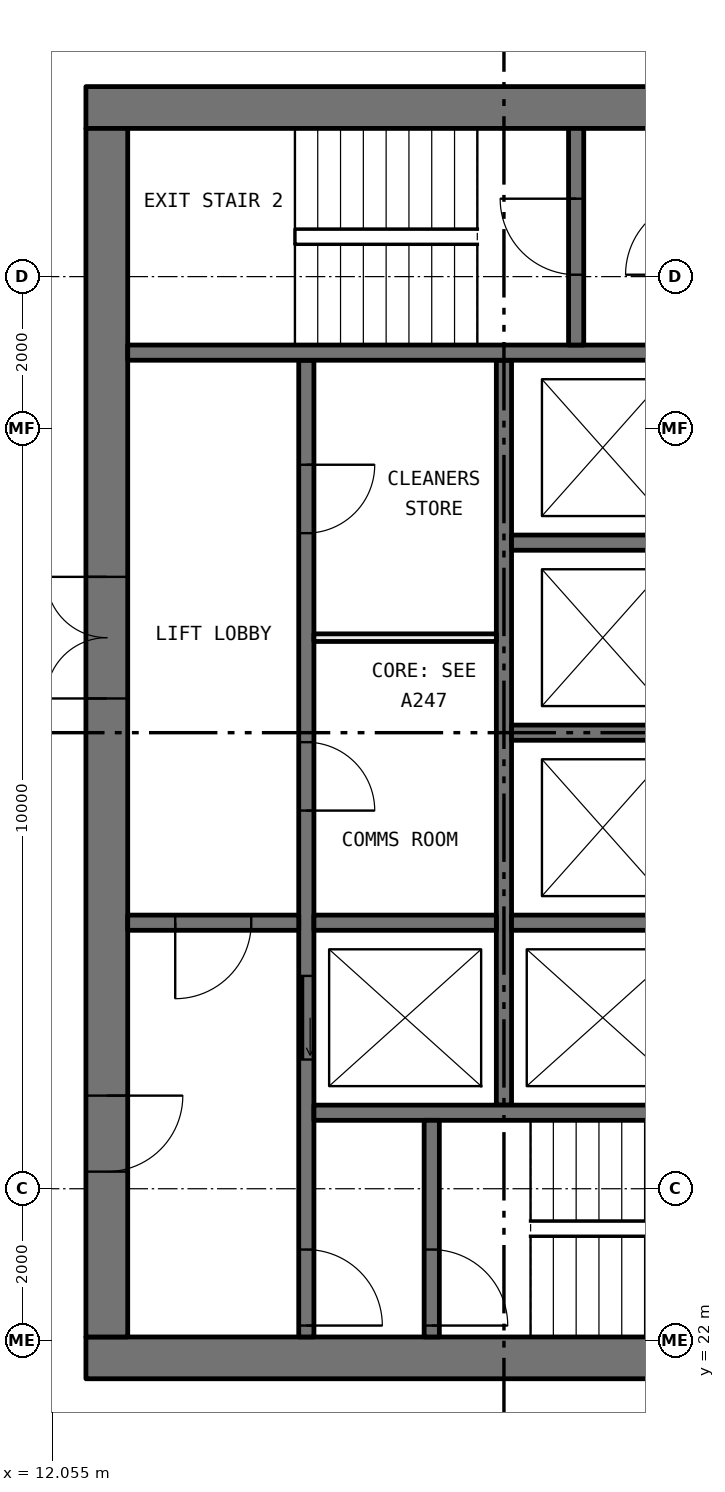
"""IFC4 building model, lengths in metres.
Left out: names, types, materials, properties, quantities, classifications, styles, units other than length and angle.
Written with IfcOpenShell. Run it as: python <this file> out.ifc"""

import sys

from ifc_helpers import new_model, si_unit, direction, frame, frame_2d, origin, place, context, subcontext, project, spatial, rectangle, extrude, element, fill, save


model = new_model("IFC4")
c1 = context("Model", 3, precision=1e-05, world=origin(), true_north=direction((0.0, 1.0)))
c2 = subcontext(c1, "Body", "Model", "MODEL_VIEW")
j1 = project(units=[si_unit("LENGTHUNIT", "METRE"), si_unit("PLANEANGLEUNIT", "RADIAN")], contexts=[c1])
p1 = place(None, origin())
s1 = spatial("IfcSite", under=j1, at=p1, CompositionType="ELEMENT")
p2 = place(p1, origin())
s2 = spatial("IfcBuilding", under=s1, at=p2, CompositionType="ELEMENT")
p3 = place(p2, frame((0.0, 0.0, 175.5)))
s3 = spatial("IfcBuildingStorey", under=s2, at=p3, CompositionType="ELEMENT", Elevation=175.5)
p4 = place(p3, frame((12.5, 21.775, 0.0), z_axis=(0.0, 0.0, 1.0), x_axis=(1.0, 0.0, 0.0)))
e1 = element("IfcWall", 1, at=p4, inside=s3, PredefinedType="SHEAR", context=c2, shape_type="SweptSolid", body=[
    extrude(rectangle(XDim=11.0, YDim=0.55, at=frame_2d((5.5, 0.0))), origin(), (0.0, 0.0, 1.0), 3.05),
])
p5 = place(p3, frame((12.5, 38.225, 0.0), z_axis=(0.0, 0.0, 1.0), x_axis=(1.0, 0.0, 0.0)))
e2 = element("IfcWall", 2, at=p5, inside=s3, PredefinedType="SHEAR", context=c2, shape_type="SweptSolid", body=[
    extrude(rectangle(XDim=11.0, YDim=0.55, at=frame_2d((5.5, 0.0))), origin(), (0.0, 0.0, 1.0), 3.05),
])
p6 = place(p5, frame((8.525, 0.0, 0.0)))
e3 = element("IfcOpeningElement", 3, at=p6, cuts=e2, PredefinedType="OPENING", context=c2, shape_type="SweptSolid", body=[
    extrude(rectangle(XDim=1.6, YDim=2.1, at=frame_2d((0.8, 1.05))), frame((0.0, 0.285, 0.0), z_axis=(0.0, -1.0, 0.0), x_axis=(1.0, 0.0, 0.0)), (0.0, 0.0, 1.0), 0.57),
])
p7 = place(p3, frame((12.775, 22.05, 0.0), z_axis=(0.0, 0.0, 1.0), x_axis=(0.0, 1.0, 0.0)))
e4 = element("IfcWall", 4, at=p7, inside=s3, PredefinedType="SHEAR", context=c2, shape_type="SweptSolid", body=[
    extrude(rectangle(XDim=15.9, YDim=0.55, at=frame_2d((7.95, 0.0))), origin(), (0.0, 0.0, 1.0), 3.05),
])
p8 = place(p7, frame((8.4, 0.0, 0.0)))
e5 = element("IfcOpeningElement", 5, at=p8, cuts=e4, PredefinedType="OPENING", context=c2, shape_type="SweptSolid", body=[
    extrude(rectangle(XDim=1.6, YDim=2.1, at=frame_2d((0.8, 1.05))), frame((0.0, 0.285, 0.0), z_axis=(0.0, -1.0, 0.0), x_axis=(1.0, 0.0, 0.0)), (0.0, 0.0, 1.0), 0.57),
])
p9 = place(p7, frame((2.175, 0.0, 0.0)))
e6 = element("IfcOpeningElement", 6, at=p9, cuts=e4, PredefinedType="OPENING", context=c2, shape_type="SweptSolid", body=[
    extrude(rectangle(XDim=1.0, YDim=2.1, at=frame_2d((0.5, 1.05))), frame((0.0, 0.285, 0.0), z_axis=(0.0, -1.0, 0.0), x_axis=(1.0, 0.0, 0.0)), (0.0, 0.0, 1.0), 0.57),
])
p10 = place(p3, frame((15.4, 22.05, 0.0), z_axis=(0.0, 0.0, 1.0), x_axis=(0.0, 1.0, 0.0)))
e7 = element("IfcWall", 7, at=p10, inside=s3, PredefinedType="SOLIDWALL", context=c2, shape_type="SweptSolid", body=[
    extrude(rectangle(XDim=12.85, YDim=0.2, at=frame_2d((6.425, 0.0))), origin(), (0.0, 0.0, 1.0), 3.05),
])
p11 = place(p10, frame((3.65, 0.0, 0.0)))
e8 = element("IfcOpeningElement", 8, at=p11, cuts=e7, PredefinedType="OPENING", context=c2, shape_type="SweptSolid", body=[
    extrude(rectangle(XDim=1.1, YDim=2.1, at=frame_2d((0.55, 1.05))), frame((0.0, 0.11, 0.0), z_axis=(0.0, -1.0, 0.0), x_axis=(1.0, 0.0, 0.0)), (0.0, 0.0, 1.0), 0.22),
])
p12 = place(p10, frame((0.15, 0.0, 0.0)))
e9 = element("IfcOpeningElement", 9, at=p12, cuts=e7, PredefinedType="OPENING", context=c2, shape_type="SweptSolid", body=[
    extrude(rectangle(XDim=1.0, YDim=2.1, at=frame_2d((0.5, 1.05))), frame((0.0, 0.11, 0.0), z_axis=(0.0, -1.0, 0.0), x_axis=(1.0, 0.0, 0.0)), (0.0, 0.0, 1.0), 0.22),
])
p13 = place(p10, frame((6.925, 0.0, 0.0)))
e10 = element("IfcOpeningElement", 10, at=p13, cuts=e7, PredefinedType="OPENING", context=c2, shape_type="SweptSolid", body=[
    extrude(rectangle(XDim=0.9, YDim=2.1, at=frame_2d((0.45, 1.05))), frame((0.0, 0.11, 0.0), z_axis=(0.0, -1.0, 0.0), x_axis=(1.0, 0.0, 0.0)), (0.0, 0.0, 1.0), 0.22),
])
p14 = place(p10, frame((10.575, 0.0, 0.0)))
e11 = element("IfcOpeningElement", 11, at=p14, cuts=e7, PredefinedType="OPENING", context=c2, shape_type="SweptSolid", body=[
    extrude(rectangle(XDim=0.9, YDim=2.1, at=frame_2d((0.45, 1.05))), frame((0.0, 0.11, 0.0), z_axis=(0.0, -1.0, 0.0), x_axis=(1.0, 0.0, 0.0)), (0.0, 0.0, 1.0), 0.22),
])
p15 = place(p3, frame((18.0, 25.1, 0.0), z_axis=(0.0, 0.0, 1.0), x_axis=(0.0, 1.0, 0.0)))
e12 = element("IfcWall", 12, at=p15, inside=s3, PredefinedType="SOLIDWALL", context=c2, shape_type="SweptSolid", body=[
    extrude(rectangle(XDim=9.8, YDim=0.2, at=frame_2d((4.9, 0.0))), origin(), (0.0, 0.0, 1.0), 3.05),
])
for number, where, z_axis, x_axis in (
    (13, (15.5, 25.0, 0.0), (0.0, 0.0, 1.0), (1.0, 0.0, 0.0)),
    (14, (13.05, 35.0, 0.0), (0.0, 0.0, 1.0), (1.0, 0.0, 0.0)),
):
    element("IfcWall", number, at=place(p3, frame(where, z_axis=z_axis, x_axis=x_axis)), inside=s3, PredefinedType="SOLIDWALL", context=c2, shape_type="SweptSolid", body=[
        extrude(rectangle(XDim=7.45, YDim=0.2, at=frame_2d((3.725, 0.0))), origin(), (0.0, 0.0, 1.0), 3.05),
    ])
p16 = place(p3, frame((13.05, 27.5, 0.0), z_axis=(0.0, 0.0, 1.0), x_axis=(1.0, 0.0, 0.0)))
e15 = element("IfcWall", 15, at=p16, inside=s3, PredefinedType="SOLIDWALL", context=c2, shape_type="SweptSolid", body=[
    extrude(rectangle(XDim=2.25, YDim=0.2, at=frame_2d((1.125, 0.0))), origin(), (0.0, 0.0, 1.0), 3.05),
])
p17 = place(p16, frame((0.625, 0.0, 0.0)))
e16 = element("IfcOpeningElement", 16, at=p17, cuts=e15, PredefinedType="OPENING", context=c2, shape_type="SweptSolid", body=[
    extrude(rectangle(XDim=1.0, YDim=2.1, at=frame_2d((0.5, 1.05))), frame((0.0, 0.11, 0.0), z_axis=(0.0, -1.0, 0.0), x_axis=(1.0, 0.0, 0.0)), (0.0, 0.0, 1.0), 0.22),
])
p18 = place(p3, frame((17.05, 22.05, 0.0), z_axis=(0.0, 0.0, 1.0), x_axis=(0.0, 1.0, 0.0)))
e17 = element("IfcWall", 17, at=p18, inside=s3, PredefinedType="SOLIDWALL", context=c2, shape_type="SweptSolid", body=[
    extrude(rectangle(XDim=2.85, YDim=0.2, at=frame_2d((1.425, 0.0))), origin(), (0.0, 0.0, 1.0), 3.05),
])
p19 = place(p18, frame((0.15, 0.0, 0.0)))
e18 = element("IfcOpeningElement", 18, at=p19, cuts=e17, PredefinedType="OPENING", context=c2, shape_type="SweptSolid", body=[
    extrude(rectangle(XDim=1.0, YDim=2.1, at=frame_2d((0.5, 1.05))), frame((0.0, 0.11, 0.0), z_axis=(0.0, -1.0, 0.0), x_axis=(1.0, 0.0, 0.0)), (0.0, 0.0, 1.0), 0.22),
])
p20 = place(p3, frame((18.95, 35.1, 0.0), z_axis=(0.0, 0.0, 1.0), x_axis=(0.0, 1.0, 0.0)))
e19 = element("IfcWall", 19, at=p20, inside=s3, PredefinedType="SOLIDWALL", context=c2, shape_type="SweptSolid", body=[
    extrude(rectangle(XDim=2.85, YDim=0.2, at=frame_2d((1.425, 0.0))), origin(), (0.0, 0.0, 1.0), 3.05),
])
p21 = place(p20, frame((0.925, 0.0, 0.0)))
e20 = element("IfcOpeningElement", 20, at=p21, cuts=e19, PredefinedType="OPENING", context=c2, shape_type="SweptSolid", body=[
    extrude(rectangle(XDim=1.0, YDim=2.1, at=frame_2d((0.5, 1.05))), frame((0.0, 0.11, 0.0), z_axis=(0.0, -1.0, 0.0), x_axis=(1.0, 0.0, 0.0)), (0.0, 0.0, 1.0), 0.22),
])
for number, where, z_axis, x_axis in (
    (21, (15.5, 27.5, 0.0), (0.0, 0.0, 1.0), (1.0, 0.0, 0.0)),
    (22, (18.1, 27.5, 0.0), (0.0, 0.0, 1.0), (1.0, 0.0, 0.0)),
    (23, (18.1, 30.0, 0.0), (0.0, 0.0, 1.0), (1.0, 0.0, 0.0)),
    (24, (18.1, 32.5, 0.0), (0.0, 0.0, 1.0), (1.0, 0.0, 0.0)),
):
    element("IfcWall", number, at=place(p3, frame(where, z_axis=z_axis, x_axis=x_axis)), inside=s3, PredefinedType="SOLIDWALL", context=c2, shape_type="SweptSolid", body=[
        extrude(rectangle(XDim=2.4, YDim=0.2, at=frame_2d((1.2, 0.0))), origin(), (0.0, 0.0, 1.0), 3.05),
    ])
p22 = place(p3, frame((15.5, 31.25, 0.0), z_axis=(0.0, 0.0, 1.0), x_axis=(1.0, 0.0, 0.0)))
e25 = element("IfcWall", 25, at=p22, inside=s3, PredefinedType="PARTITIONING", context=c2, shape_type="SweptSolid", body=[
    extrude(rectangle(XDim=2.4, YDim=0.1, at=frame_2d((1.2, 0.0))), origin(), (0.0, 0.0, 1.0), 3.05),
])
p23 = place(p11, origin())
e26 = element("IfcDoor", 26, at=p23, inside=s3, OperationType="SLIDING_TO_LEFT", PredefinedType="DOOR", context=c2, shape_type="SweptSolid", body=[
    extrude(rectangle(XDim=1.1, YDim=2.1, at=frame_2d((0.55, 1.05))), frame((0.0, 0.025, 0.0), z_axis=(0.0, -1.0, 0.0), x_axis=(1.0, 0.0, 0.0)), (0.0, 0.0, 1.0), 0.05),
])
fill(e8, e26)
p24 = place(p19, frame((1.0, 0.0, 0.0), x_axis=(-1.0, 0.0, 0.0)))
e27 = element("IfcDoor", 27, at=p24, inside=s3, OperationType="SINGLE_SWING_LEFT", PredefinedType="DOOR", context=c2, shape_type="SweptSolid", body=[
    extrude(rectangle(XDim=1.0, YDim=2.1, at=frame_2d((0.5, 1.05))), frame((0.0, 0.025, 0.0), z_axis=(0.0, -1.0, 0.0), x_axis=(1.0, 0.0, 0.0)), (0.0, 0.0, 1.0), 0.05),
])
fill(e18, e27)
p25 = place(p12, frame((1.0, 0.0, 0.0), x_axis=(-1.0, 0.0, 0.0)))
e28 = element("IfcDoor", 28, at=p25, inside=s3, OperationType="SINGLE_SWING_LEFT", PredefinedType="DOOR", context=c2, shape_type="SweptSolid", body=[
    extrude(rectangle(XDim=1.0, YDim=2.1, at=frame_2d((0.5, 1.05))), frame((0.0, 0.025, 0.0), z_axis=(0.0, -1.0, 0.0), x_axis=(1.0, 0.0, 0.0)), (0.0, 0.0, 1.0), 0.05),
])
fill(e9, e28)
p26 = place(p21, origin())
e29 = element("IfcDoor", 29, at=p26, inside=s3, OperationType="SINGLE_SWING_LEFT", PredefinedType="DOOR", context=c2, shape_type="SweptSolid", body=[
    extrude(rectangle(XDim=1.0, YDim=2.1, at=frame_2d((0.5, 1.05))), frame((0.0, 0.025, 0.0), z_axis=(0.0, -1.0, 0.0), x_axis=(1.0, 0.0, 0.0)), (0.0, 0.0, 1.0), 0.05),
])
fill(e20, e29)
p27 = place(p17, frame((1.0, 0.0, 0.0), x_axis=(-1.0, 0.0, 0.0)))
e30 = element("IfcDoor", 30, at=p27, inside=s3, OperationType="SINGLE_SWING_LEFT", PredefinedType="DOOR", context=c2, shape_type="SweptSolid", body=[
    extrude(rectangle(XDim=1.0, YDim=2.1, at=frame_2d((0.5, 1.05))), frame((0.0, 0.025, 0.0), z_axis=(0.0, -1.0, 0.0), x_axis=(1.0, 0.0, 0.0)), (0.0, 0.0, 1.0), 0.05),
])
fill(e16, e30)
p28 = place(p8, origin())
e31 = element("IfcDoor", 31, at=p28, inside=s3, OperationType="DOUBLE_DOOR_SINGLE_SWING", PredefinedType="DOOR", context=c2, shape_type="SweptSolid", body=[
    extrude(rectangle(XDim=1.6, YDim=2.1, at=frame_2d((0.8, 1.05))), frame((0.0, 0.025, 0.0), z_axis=(0.0, -1.0, 0.0), x_axis=(1.0, 0.0, 0.0)), (0.0, 0.0, 1.0), 0.05),
])
fill(e5, e31)
p29 = place(p9, frame((1.0, 0.0, 0.0), x_axis=(-1.0, 0.0, 0.0)))
e32 = element("IfcDoor", 32, at=p29, inside=s3, OperationType="SINGLE_SWING_RIGHT", PredefinedType="DOOR", context=c2, shape_type="SweptSolid", body=[
    extrude(rectangle(XDim=1.0, YDim=2.1, at=frame_2d((0.5, 1.05))), frame((0.0, 0.025, 0.0), z_axis=(0.0, -1.0, 0.0), x_axis=(1.0, 0.0, 0.0)), (0.0, 0.0, 1.0), 0.05),
])
fill(e6, e32)
p30 = place(p13, frame((0.9, 0.0, 0.0), x_axis=(-1.0, 0.0, 0.0)))
e33 = element("IfcDoor", 33, at=p30, inside=s3, OperationType="SINGLE_SWING_LEFT", PredefinedType="DOOR", context=c2, shape_type="SweptSolid", body=[
    extrude(rectangle(XDim=0.9, YDim=2.1, at=frame_2d((0.45, 1.05))), frame((0.0, 0.025, 0.0), z_axis=(0.0, -1.0, 0.0), x_axis=(1.0, 0.0, 0.0)), (0.0, 0.0, 1.0), 0.05),
])
fill(e10, e33)
p31 = place(p14, frame((0.9, 0.0, 0.0), x_axis=(-1.0, 0.0, 0.0)))
e34 = element("IfcDoor", 34, at=p31, inside=s3, OperationType="SINGLE_SWING_RIGHT", PredefinedType="DOOR", context=c2, shape_type="SweptSolid", body=[
    extrude(rectangle(XDim=0.9, YDim=2.1, at=frame_2d((0.45, 1.05))), frame((0.0, 0.025, 0.0), z_axis=(0.0, -1.0, 0.0), x_axis=(1.0, 0.0, 0.0)), (0.0, 0.0, 1.0), 0.05),
])
fill(e11, e34)
save(model, sys.argv[1])
